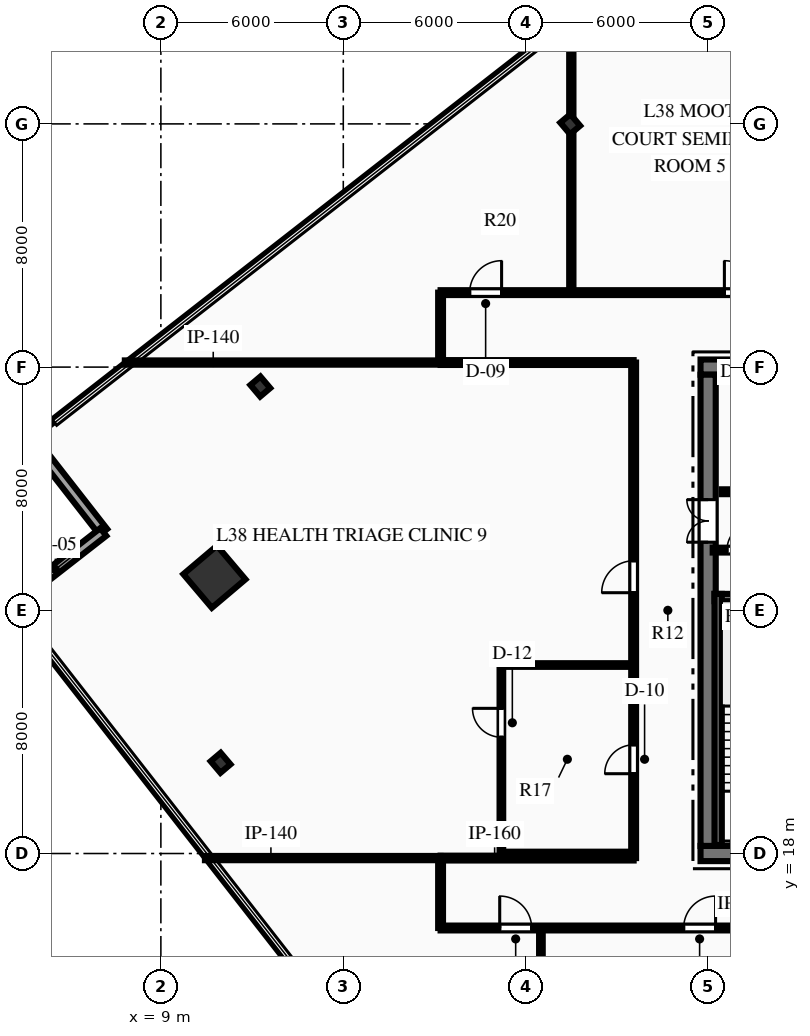
"""IFC4 building model, lengths in metres.
Left out: names, types, materials, properties, quantities, classifications, styles, units other than length and angle.
Written with IfcOpenShell. Run it as: python <this file> out.ifc"""

import sys

from ifc_helpers import new_model, si_unit, direction, frame, frame_2d, origin, origin_2d, place, context, subcontext, project, spatial, rectangle, hollow_rectangle, i_section, extrude, element, fill, save


model = new_model("IFC4")
c1 = context("Model", 3, precision=1e-05, world=origin(), true_north=direction((0.0, 1.0)))
c2 = subcontext(c1, "Body", "Model", "MODEL_VIEW")
j1 = project(units=[si_unit("LENGTHUNIT", "METRE"), si_unit("PLANEANGLEUNIT", "RADIAN")], contexts=[c1])
p1 = place(None, origin())
s1 = spatial("IfcSite", under=j1, at=p1, CompositionType="ELEMENT")
p2 = place(p1, origin())
s2 = spatial("IfcBuilding", under=s1, at=p2, CompositionType="ELEMENT")
p3 = place(p2, frame((0.0, 0.0, 155.7)))
s3 = spatial("IfcBuildingStorey", under=s2, at=p3, CompositionType="ELEMENT", Elevation=155.7)
p4 = place(p3, frame((26.75, 18.0, 0.0), z_axis=(0.0, 0.0, 1.0), x_axis=(1.0, 0.0, 0.0)))
e1 = element("IfcWall", 1, at=p4, inside=s3, PredefinedType="SHEAR", context=c2, shape_type="SweptSolid", body=[
    extrude(rectangle(XDim=18.5, YDim=0.5, at=frame_2d((9.25, 0.0))), origin(), (0.0, 0.0, 1.0), 3.75),
])
p5 = place(p4, frame((7.35, 0.0, 0.0)))
e2 = element("IfcOpeningElement", 2, at=p5, cuts=e1, PredefinedType="OPENING", context=c2, shape_type="SweptSolid", body=[
    extrude(rectangle(XDim=1.1, YDim=2.15, at=frame_2d((0.55, 1.075))), frame((0.0, 0.26, 0.0), z_axis=(0.0, -1.0, 0.0), x_axis=(1.0, 0.0, 0.0)), (0.0, 0.0, 1.0), 0.52),
])
p6 = place(p4, frame((10.05, 0.0, 0.0)))
e3 = element("IfcOpeningElement", 3, at=p6, cuts=e1, PredefinedType="OPENING", context=c2, shape_type="SweptSolid", body=[
    extrude(rectangle(XDim=1.1, YDim=2.15, at=frame_2d((0.55, 1.075))), frame((0.0, 0.26, 0.0), z_axis=(0.0, -1.0, 0.0), x_axis=(1.0, 0.0, 0.0)), (0.0, 0.0, 1.0), 0.52),
])
p7 = place(p3, frame((26.75, 34.0, 0.0), z_axis=(0.0, 0.0, 1.0), x_axis=(1.0, 0.0, 0.0)))
e4 = element("IfcWall", 4, at=p7, inside=s3, PredefinedType="SHEAR", context=c2, shape_type="SweptSolid", body=[
    extrude(rectangle(XDim=18.5, YDim=0.5, at=frame_2d((9.25, 0.0))), origin(), (0.0, 0.0, 1.0), 3.75),
])
p8 = place(p7, frame((13.935, 0.0, 0.0)))
e5 = element("IfcOpeningElement", 5, at=p8, cuts=e4, PredefinedType="OPENING", context=c2, shape_type="SweptSolid", body=[
    extrude(rectangle(XDim=1.1, YDim=2.15, at=frame_2d((0.55, 1.075))), frame((0.0, 0.26, 0.0), z_axis=(0.0, -1.0, 0.0), x_axis=(1.0, 0.0, 0.0)), (0.0, 0.0, 1.0), 0.52),
])
p9 = place(p7, frame((16.185, 0.0, 0.0)))
e6 = element("IfcOpeningElement", 6, at=p9, cuts=e4, PredefinedType="OPENING", context=c2, shape_type="SweptSolid", body=[
    extrude(rectangle(XDim=1.1, YDim=2.15, at=frame_2d((0.55, 1.075))), frame((0.0, 0.26, 0.0), z_axis=(0.0, -1.0, 0.0), x_axis=(1.0, 0.0, 0.0)), (0.0, 0.0, 1.0), 0.52),
])
p10 = place(p3, frame((27.0, 18.25, 0.0), z_axis=(0.0, 0.0, 1.0), x_axis=(0.0, 1.0, 0.0)))
e7 = element("IfcWall", 7, at=p10, inside=s3, PredefinedType="SHEAR", context=c2, shape_type="SweptSolid", body=[
    extrude(rectangle(XDim=15.5, YDim=0.5, at=frame_2d((7.75, 0.0))), origin(), (0.0, 0.0, 1.0), 3.75),
])
p11 = place(p10, frame((9.99, 0.0, 0.0)))
e8 = element("IfcOpeningElement", 8, at=p11, cuts=e7, PredefinedType="OPENING", context=c2, shape_type="SweptSolid", body=[
    extrude(rectangle(XDim=1.4, YDim=2.2, at=frame_2d((0.7, 1.1))), frame((0.0, 0.26, 0.0), z_axis=(0.0, -1.0, 0.0), x_axis=(1.0, 0.0, 0.0)), (0.0, 0.0, 1.0), 0.52),
])
p12 = place(p3, frame((27.21, 26.42, 0.0), z_axis=(0.0, 0.0, 1.0), x_axis=(1.0, 0.0, 0.0)))
e9 = element("IfcWall", 9, at=p12, inside=s3, PredefinedType="SHEAR", context=c2, shape_type="SweptSolid", body=[
    extrude(rectangle(XDim=3.98, YDim=0.24, at=frame_2d((1.99, 0.0))), origin(), (0.0, 0.0, 1.0), 3.75),
])
p13 = place(p3, frame((27.33, 18.28, 0.0), z_axis=(0.0, 0.0, 1.0), x_axis=(0.0, 1.0, 0.0)))
e10 = element("IfcWall", 10, at=p13, inside=s3, PredefinedType="SHEAR", context=c2, shape_type="SweptSolid", body=[
    extrude(rectangle(XDim=8.26, YDim=0.24, at=frame_2d((4.13, 0.0))), origin(), (0.0, 0.0, 1.0), 3.75),
])
p14 = place(p3, frame((10.761, 27.104, 0.0), z_axis=(0.0, 0.0, 1.0), x_axis=(0.763232469783, 0.646123979643, 0.0)))
e11 = element("IfcColumn", 11, at=p14, inside=s3, PredefinedType="COLUMN", context=c2, shape_type="SweptSolid", body=[
    extrude(hollow_rectangle(XDim=1.45, YDim=1.45, WallThickness=0.07, at=origin_2d()), origin(), (0.0, 0.0, 1.0), 3.75),
])
for number, where, z_axis, x_axis in (
    (12, (22.464, 41.99, 0.0), (0.0, 0.0, 1.0), (0.763, 0.646, 0.0)),
    (13, (12.27, 33.36, 0.0), (0.0, 0.0, 1.0), (0.763, 0.646, 0.0)),
    (14, (10.963, 20.983, 0.0), (0.0, 0.0, 1.0), (0.763, 0.646, 0.0)),
):
    element("IfcColumn", number, at=place(p3, frame(where, z_axis=z_axis, x_axis=x_axis)), inside=s3, PredefinedType="COLUMN", context=c2, shape_type="SweptSolid", body=[
        extrude(i_section(OverallWidth=0.432, OverallDepth=0.498, WebThickness=0.056, FlangeThickness=0.089, at=origin_2d()), origin(), (0.0, 0.0, 1.0), 3.75),
    ])
p15 = place(p3, frame((4.646, 31.73, 0.0), z_axis=(0.0, 0.0, 1.0), x_axis=(0.788562815333, 0.614954214778, 0.0)))
e15 = element("IfcWall", 15, at=p15, inside=s3, PredefinedType="STANDARD", context=c2, shape_type="SweptSolid", body=[
    extrude(rectangle(XDim=0.9, YDim=0.32, at=frame_2d((0.45, 0.0))), origin(), (0.0, 0.0, 1.0), 3.46),
])
p16 = place(p3, frame((7.106, 28.576, 0.0), z_axis=(0.0, 0.0, 1.0), x_axis=(-0.614933129106, 0.788579258368, 0.0)))
e16 = element("IfcWall", 16, at=p16, inside=s3, PredefinedType="STANDARD", context=c2, shape_type="SweptSolid", body=[
    extrude(rectangle(XDim=4.0, YDim=0.32, at=frame_2d((2.0, 0.0))), origin(), (0.0, 0.0, 1.0), 3.46),
])
p17 = place(p3, frame((3.952, 26.116, 0.0), z_axis=(0.0, 0.0, 1.0), x_axis=(0.788556176552, 0.614962727669, 0.0)))
e17 = element("IfcWall", 17, at=p17, inside=s3, PredefinedType="STANDARD", context=c2, shape_type="SweptSolid", body=[
    extrude(rectangle(XDim=4.0, YDim=0.32, at=frame_2d((2.0, 0.0))), origin(), (0.0, 0.0, 1.0), 3.46),
])
p18 = place(p17, frame((1.275, 0.0, 0.85)))
e18 = element("IfcOpeningElement", 18, at=p18, cuts=e17, PredefinedType="OPENING", context=c2, shape_type="SweptSolid", body=[
    extrude(rectangle(XDim=1.45, YDim=2.05, at=frame_2d((0.725, 1.025))), frame((0.0, 0.17, 0.0), z_axis=(0.0, -1.0, 0.0), x_axis=(1.0, 0.0, 0.0)), (0.0, 0.0, 1.0), 0.34),
])
p19 = place(p3, frame((27.15, 27.98, 0.0), z_axis=(0.0, 0.0, 1.0), x_axis=(1.0, 0.0, 0.0)))
e19 = element("IfcWall", 19, at=p19, inside=s3, PredefinedType="PARTITIONING", context=c2, shape_type="SweptSolid", body=[
    extrude(rectangle(XDim=4.05, YDim=0.16, at=frame_2d((2.025, 0.0))), origin(), (0.0, 0.0, 1.0), 3.46),
])
p20 = place(p19, frame((0.47, 0.0, 0.0)))
e20 = element("IfcOpeningElement", 20, at=p20, cuts=e19, PredefinedType="OPENING", context=c2, shape_type="SweptSolid", body=[
    extrude(rectangle(XDim=0.9, YDim=2.15, at=frame_2d((0.45, 1.075))), frame((0.0, 0.09, 0.0), z_axis=(0.0, -1.0, 0.0), x_axis=(1.0, 0.0, 0.0)), (0.0, 0.0, 1.0), 0.18),
])
p21 = place(p19, frame((2.36, 0.0, 0.0)))
e21 = element("IfcOpeningElement", 21, at=p21, cuts=e19, PredefinedType="OPENING", context=c2, shape_type="SweptSolid", body=[
    extrude(rectangle(XDim=0.9, YDim=2.15, at=frame_2d((0.45, 1.075))), frame((0.0, 0.09, 0.0), z_axis=(0.0, -1.0, 0.0), x_axis=(1.0, 0.0, 0.0)), (0.0, 0.0, 1.0), 0.18),
])
p22 = place(p3, frame((27.45, 29.9, 0.0), z_axis=(0.0, 0.0, 1.0), x_axis=(1.0, 0.0, 0.0)))
e22 = element("IfcWall", 22, at=p22, inside=s3, PredefinedType="PARTITIONING", context=c2, shape_type="SweptSolid", body=[
    extrude(rectangle(XDim=4.43, YDim=0.16, at=frame_2d((2.215, 0.0))), origin(), (0.0, 0.0, 1.0), 3.46),
])
p23 = place(p22, frame((0.6, 0.0, 0.0)))
e23 = element("IfcOpeningElement", 23, at=p23, cuts=e22, PredefinedType="OPENING", context=c2, shape_type="SweptSolid", body=[
    extrude(rectangle(XDim=0.9, YDim=2.15, at=frame_2d((0.45, 1.075))), frame((0.0, 0.09, 0.0), z_axis=(0.0, -1.0, 0.0), x_axis=(1.0, 0.0, 0.0)), (0.0, 0.0, 1.0), 0.18),
])
p24 = place(p22, frame((2.85, 0.0, 0.0)))
e24 = element("IfcOpeningElement", 24, at=p24, cuts=e22, PredefinedType="OPENING", context=c2, shape_type="SweptSolid", body=[
    extrude(rectangle(XDim=0.9, YDim=2.15, at=frame_2d((0.45, 1.075))), frame((0.0, 0.09, 0.0), z_axis=(0.0, -1.0, 0.0), x_axis=(1.0, 0.0, 0.0)), (0.0, 0.0, 1.0), 0.18),
])
p25 = place(p3, frame((18.2, 15.55, 0.0), z_axis=(0.0, 0.0, 1.0), x_axis=(1.0, 0.0, 0.0)))
e25 = element("IfcWall", 25, at=p25, inside=s3, PredefinedType="PARTITIONING", context=c2, shape_type="SweptSolid", body=[
    extrude(rectangle(XDim=35.6, YDim=0.16, at=frame_2d((17.8, 0.0))), origin(), (0.0, 0.0, 1.0), 3.46),
])
p26 = place(p25, frame((22.45, 0.0, 0.0)))
e26 = element("IfcOpeningElement", 26, at=p26, cuts=e25, PredefinedType="OPENING", context=c2, shape_type="SweptSolid", body=[
    extrude(rectangle(XDim=0.9, YDim=2.15, at=frame_2d((0.45, 1.075))), frame((0.0, 0.09, 0.0), z_axis=(0.0, -1.0, 0.0), x_axis=(1.0, 0.0, 0.0)), (0.0, 0.0, 1.0), 0.18),
])
p27 = place(p25, frame((24.75, 0.0, 0.0)))
e27 = element("IfcOpeningElement", 27, at=p27, cuts=e25, PredefinedType="OPENING", context=c2, shape_type="SweptSolid", body=[
    extrude(rectangle(XDim=0.9, YDim=2.15, at=frame_2d((0.45, 1.075))), frame((0.0, 0.09, 0.0), z_axis=(0.0, -1.0, 0.0), x_axis=(1.0, 0.0, 0.0)), (0.0, 0.0, 1.0), 0.18),
])
p28 = place(p25, frame((27.0, 0.0, 0.0)))
e28 = element("IfcOpeningElement", 28, at=p28, cuts=e25, PredefinedType="OPENING", context=c2, shape_type="SweptSolid", body=[
    extrude(rectangle(XDim=1.0, YDim=2.15, at=frame_2d((0.5, 1.075))), frame((0.0, 0.09, 0.0), z_axis=(0.0, -1.0, 0.0), x_axis=(1.0, 0.0, 0.0)), (0.0, 0.0, 1.0), 0.18),
])
p29 = place(p25, frame((1.945, 0.0, 0.0)))
e29 = element("IfcOpeningElement", 29, at=p29, cuts=e25, PredefinedType="OPENING", context=c2, shape_type="SweptSolid", body=[
    extrude(rectangle(XDim=1.05, YDim=2.15, at=frame_2d((0.525, 1.075))), frame((0.0, 0.09, 0.0), z_axis=(0.0, -1.0, 0.0), x_axis=(1.0, 0.0, 0.0)), (0.0, 0.0, 1.0), 0.18),
])
p30 = place(p25, frame((7.995, 0.0, 0.0)))
e30 = element("IfcOpeningElement", 30, at=p30, cuts=e25, PredefinedType="OPENING", context=c2, shape_type="SweptSolid", body=[
    extrude(rectangle(XDim=1.05, YDim=2.15, at=frame_2d((0.525, 1.075))), frame((0.0, 0.09, 0.0), z_axis=(0.0, -1.0, 0.0), x_axis=(1.0, 0.0, 0.0)), (0.0, 0.0, 1.0), 0.18),
])
p31 = place(p25, frame((15.74, 0.0, 0.0)))
e31 = element("IfcOpeningElement", 31, at=p31, cuts=e25, PredefinedType="OPENING", context=c2, shape_type="SweptSolid", body=[
    extrude(rectangle(XDim=1.05, YDim=2.15, at=frame_2d((0.525, 1.075))), frame((0.0, 0.09, 0.0), z_axis=(0.0, -1.0, 0.0), x_axis=(1.0, 0.0, 0.0)), (0.0, 0.0, 1.0), 0.18),
])
p32 = place(p3, frame((18.2, 17.85, 0.0), z_axis=(0.0, 0.0, 1.0), x_axis=(1.0, 0.0, 0.0)))
e32 = element("IfcWall", 32, at=p32, inside=s3, PredefinedType="PARTITIONING", context=c2, shape_type="SweptSolid", body=[
    extrude(rectangle(XDim=6.35, YDim=0.16, at=frame_2d((3.175, 0.0))), origin(), (0.0, 0.0, 1.0), 3.46),
])
p33 = place(p3, frame((18.2, 36.45, 0.0), z_axis=(0.0, 0.0, 1.0), x_axis=(1.0, 0.0, 0.0)))
e33 = element("IfcWall", 33, at=p33, inside=s3, PredefinedType="PARTITIONING", context=c2, shape_type="SweptSolid", body=[
    extrude(rectangle(XDim=35.6, YDim=0.16, at=frame_2d((17.8, 0.0))), origin(), (0.0, 0.0, 1.0), 3.46),
])
p34 = place(p33, frame((0.957, 0.0, 0.0)))
e34 = element("IfcOpeningElement", 34, at=p34, cuts=e33, PredefinedType="OPENING", context=c2, shape_type="SweptSolid", body=[
    extrude(rectangle(XDim=1.05, YDim=2.15, at=frame_2d((0.525, 1.075))), frame((0.0, 0.09, 0.0), z_axis=(0.0, -1.0, 0.0), x_axis=(1.0, 0.0, 0.0)), (0.0, 0.0, 1.0), 0.18),
])
p35 = place(p33, frame((9.335, 0.0, 0.0)))
e35 = element("IfcOpeningElement", 35, at=p35, cuts=e33, PredefinedType="OPENING", context=c2, shape_type="SweptSolid", body=[
    extrude(rectangle(XDim=1.05, YDim=2.15, at=frame_2d((0.525, 1.075))), frame((0.0, 0.09, 0.0), z_axis=(0.0, -1.0, 0.0), x_axis=(1.0, 0.0, 0.0)), (0.0, 0.0, 1.0), 0.18),
])
p36 = place(p33, frame((17.675, 0.0, 0.0)))
e36 = element("IfcOpeningElement", 36, at=p36, cuts=e33, PredefinedType="OPENING", context=c2, shape_type="SweptSolid", body=[
    extrude(rectangle(XDim=1.05, YDim=2.15, at=frame_2d((0.525, 1.075))), frame((0.0, 0.09, 0.0), z_axis=(0.0, -1.0, 0.0), x_axis=(1.0, 0.0, 0.0)), (0.0, 0.0, 1.0), 0.18),
])
p37 = place(p33, frame((22.875, 0.0, 0.0)))
e37 = element("IfcOpeningElement", 37, at=p37, cuts=e33, PredefinedType="OPENING", context=c2, shape_type="SweptSolid", body=[
    extrude(rectangle(XDim=1.05, YDim=2.15, at=frame_2d((0.525, 1.075))), frame((0.0, 0.09, 0.0), z_axis=(0.0, -1.0, 0.0), x_axis=(1.0, 0.0, 0.0)), (0.0, 0.0, 1.0), 0.18),
])
p38 = place(p33, frame((30.565, 0.0, 0.0)))
e38 = element("IfcOpeningElement", 38, at=p38, cuts=e33, PredefinedType="OPENING", context=c2, shape_type="SweptSolid", body=[
    extrude(rectangle(XDim=1.05, YDim=2.15, at=frame_2d((0.525, 1.075))), frame((0.0, 0.09, 0.0), z_axis=(0.0, -1.0, 0.0), x_axis=(1.0, 0.0, 0.0)), (0.0, 0.0, 1.0), 0.18),
])
p39 = place(p3, frame((18.2, 34.15, 0.0), z_axis=(0.0, 0.0, 1.0), x_axis=(1.0, 0.0, 0.0)))
e39 = element("IfcWall", 39, at=p39, inside=s3, PredefinedType="PARTITIONING", context=c2, shape_type="SweptSolid", body=[
    extrude(rectangle(XDim=6.35, YDim=0.16, at=frame_2d((3.175, 0.0))), origin(), (0.0, 0.0, 1.0), 3.46),
])
p40 = place(p3, frame((24.55, 17.85, 0.0), z_axis=(0.0, 0.0, 1.0), x_axis=(0.0, 1.0, 0.0)))
e40 = element("IfcWall", 40, at=p40, inside=s3, PredefinedType="PARTITIONING", context=c2, shape_type="SweptSolid", body=[
    extrude(rectangle(XDim=16.3, YDim=0.16, at=frame_2d((8.15, 0.0))), origin(), (0.0, 0.0, 1.0), 3.46),
])
p41 = place(p40, frame((2.775, 0.0, 0.0)))
e41 = element("IfcOpeningElement", 41, at=p41, cuts=e40, PredefinedType="OPENING", context=c2, shape_type="SweptSolid", body=[
    extrude(rectangle(XDim=0.95, YDim=2.15, at=frame_2d((0.475, 1.075))), frame((0.0, 0.09, 0.0), z_axis=(0.0, -1.0, 0.0), x_axis=(1.0, 0.0, 0.0)), (0.0, 0.0, 1.0), 0.18),
])
p42 = place(p40, frame((8.729, 0.0, 0.0)))
e42 = element("IfcOpeningElement", 42, at=p42, cuts=e40, PredefinedType="OPENING", context=c2, shape_type="SweptSolid", body=[
    extrude(rectangle(XDim=1.05, YDim=2.15, at=frame_2d((0.525, 1.075))), frame((0.0, 0.09, 0.0), z_axis=(0.0, -1.0, 0.0), x_axis=(1.0, 0.0, 0.0)), (0.0, 0.0, 1.0), 0.18),
])
for number, where, z_axis, x_axis in (
    (43, (18.2, 15.55, 0.0), (0.0, 0.0, 1.0), (0.0, 1.0, 0.0)),
    (44, (18.2, 34.15, 0.0), (0.0, 0.0, 1.0), (0.0, 1.0, 0.0)),
):
    element("IfcWall", number, at=place(p3, frame(where, z_axis=z_axis, x_axis=x_axis)), inside=s3, PredefinedType="PARTITIONING", context=c2, shape_type="SweptSolid", body=[
        extrude(rectangle(XDim=2.3, YDim=0.16, at=frame_2d((1.15, 0.0))), origin(), (0.0, 0.0, 1.0), 3.46),
    ])
p43 = place(p3, frame((10.449, 17.85, 0.0), z_axis=(0.0, 0.0, 1.0), x_axis=(1.0, 0.0, 0.0)))
e45 = element("IfcWall", 45, at=p43, inside=s3, PredefinedType="PARTITIONING", context=c2, shape_type="SweptSolid", body=[
    extrude(rectangle(XDim=7.751, YDim=0.14, at=frame_2d((3.875, 0.0))), origin(), (0.0, 0.0, 1.0), 3.46),
])
p44 = place(p3, frame((7.814, 34.15, 0.0), z_axis=(0.0, 0.0, 1.0), x_axis=(1.0, 0.0, 0.0)))
e46 = element("IfcWall", 46, at=p44, inside=s3, PredefinedType="PARTITIONING", context=c2, shape_type="SweptSolid", body=[
    extrude(rectangle(XDim=10.385, YDim=0.14, at=frame_2d((5.193, 0.0))), origin(), (0.0, 0.0, 1.0), 3.46),
])
p45 = place(p3, frame((21.5, 3.68, 0.0), z_axis=(0.0, 0.0, 1.0), x_axis=(0.0, 1.0, 0.0)))
e47 = element("IfcWall", 47, at=p45, inside=s3, PredefinedType="PARTITIONING", context=c2, shape_type="SweptSolid", body=[
    extrude(rectangle(XDim=11.87, YDim=0.12, at=frame_2d((5.935, 0.0))), origin(), (0.0, 0.0, 1.0), 3.46),
])
p46 = place(p3, frame((22.5, 36.45, 0.0), z_axis=(0.0, 0.0, 1.0), x_axis=(0.0, 1.0, 0.0)))
e48 = element("IfcWall", 48, at=p46, inside=s3, PredefinedType="PARTITIONING", context=c2, shape_type="SweptSolid", body=[
    extrude(rectangle(XDim=9.153, YDim=0.14, at=frame_2d((4.577, 0.0))), origin(), (0.0, 0.0, 1.0), 3.46),
])
p47 = place(p3, frame((20.2, 18.0, 0.0), z_axis=(0.0, 0.0, 1.0), x_axis=(1.0, 0.0, 0.0)))
e49 = element("IfcWall", 49, at=p47, inside=s3, PredefinedType="PARTITIONING", context=c2, shape_type="SweptSolid", body=[
    extrude(rectangle(XDim=4.35, YDim=0.12, at=frame_2d((2.175, 0.0))), origin(), (0.0, 0.0, 1.0), 3.46),
])
p48 = place(p3, frame((20.2, 18.0, 0.0), z_axis=(0.0, 0.0, 1.0), x_axis=(0.0, 1.0, 0.0)))
e50 = element("IfcWall", 50, at=p48, inside=s3, PredefinedType="PARTITIONING", context=c2, shape_type="SweptSolid", body=[
    extrude(rectangle(XDim=6.2, YDim=0.12, at=frame_2d((3.1, 0.0))), origin(), (0.0, 0.0, 1.0), 3.46),
])
p49 = place(p48, frame((3.825, 0.0, 0.0)))
e51 = element("IfcOpeningElement", 51, at=p49, cuts=e50, PredefinedType="OPENING", context=c2, shape_type="SweptSolid", body=[
    extrude(rectangle(XDim=0.95, YDim=2.15, at=frame_2d((0.475, 1.075))), frame((0.0, 0.07, 0.0), z_axis=(0.0, -1.0, 0.0), x_axis=(1.0, 0.0, 0.0)), (0.0, 0.0, 1.0), 0.14),
])
p50 = place(p3, frame((20.2, 24.2, 0.0), z_axis=(0.0, 0.0, 1.0), x_axis=(1.0, 0.0, 0.0)))
e52 = element("IfcWall", 52, at=p50, inside=s3, PredefinedType="PARTITIONING", context=c2, shape_type="SweptSolid", body=[
    extrude(rectangle(XDim=4.35, YDim=0.12, at=frame_2d((2.175, 0.0))), origin(), (0.0, 0.0, 1.0), 3.46),
])
p51 = place(p18, origin())
e53 = element("IfcWindow", 53, at=p51, inside=s3, PartitioningType="SINGLE_PANEL", PredefinedType="WINDOW", context=c2, shape_type="SweptSolid", body=[
    extrude(rectangle(XDim=1.45, YDim=2.05, at=frame_2d((0.725, 1.025))), frame((0.0, 0.03, 0.0), z_axis=(0.0, -1.0, 0.0), x_axis=(1.0, 0.0, 0.0)), (0.0, 0.0, 1.0), 0.06),
])
fill(e18, e53)
p52 = place(p20, origin())
e54 = element("IfcDoor", 54, at=p52, inside=s3, OperationType="SINGLE_SWING_RIGHT", PredefinedType="DOOR", context=c2, shape_type="SweptSolid", body=[
    extrude(rectangle(XDim=0.9, YDim=2.15, at=frame_2d((0.45, 1.075))), frame((0.0, 0.025, 0.0), z_axis=(0.0, -1.0, 0.0), x_axis=(1.0, 0.0, 0.0)), (0.0, 0.0, 1.0), 0.05),
])
fill(e20, e54)
p53 = place(p11, origin())
e55 = element("IfcDoor", 55, at=p53, inside=s3, OperationType="DOUBLE_DOOR_SINGLE_SWING", PredefinedType="DOOR", context=c2, shape_type="SweptSolid", body=[
    extrude(rectangle(XDim=1.4, YDim=2.2, at=frame_2d((0.7, 1.1))), frame((0.0, 0.025, 0.0), z_axis=(0.0, -1.0, 0.0), x_axis=(1.0, 0.0, 0.0)), (0.0, 0.0, 1.0), 0.05),
])
fill(e8, e55)
p54 = place(p41, origin())
e56 = element("IfcDoor", 56, at=p54, inside=s3, OperationType="SINGLE_SWING_LEFT", PredefinedType="DOOR", context=c2, shape_type="SweptSolid", body=[
    extrude(rectangle(XDim=0.95, YDim=2.15, at=frame_2d((0.475, 1.075))), frame((0.0, 0.025, 0.0), z_axis=(0.0, -1.0, 0.0), x_axis=(1.0, 0.0, 0.0)), (0.0, 0.0, 1.0), 0.05),
])
fill(e41, e56)
p55 = place(p49, origin())
e57 = element("IfcDoor", 57, at=p55, inside=s3, OperationType="SINGLE_SWING_RIGHT", PredefinedType="DOOR", context=c2, shape_type="SweptSolid", body=[
    extrude(rectangle(XDim=0.95, YDim=2.15, at=frame_2d((0.475, 1.075))), frame((0.0, 0.025, 0.0), z_axis=(0.0, -1.0, 0.0), x_axis=(1.0, 0.0, 0.0)), (0.0, 0.0, 1.0), 0.05),
])
fill(e51, e57)
p56 = place(p29, origin())
e58 = element("IfcDoor", 58, at=p56, inside=s3, OperationType="SINGLE_SWING_LEFT", PredefinedType="DOOR", context=c2, shape_type="SweptSolid", body=[
    extrude(rectangle(XDim=1.05, YDim=2.15, at=frame_2d((0.525, 1.075))), frame((0.0, 0.025, 0.0), z_axis=(0.0, -1.0, 0.0), x_axis=(1.0, 0.0, 0.0)), (0.0, 0.0, 1.0), 0.05),
])
fill(e29, e58)
p57 = place(p30, origin())
e59 = element("IfcDoor", 59, at=p57, inside=s3, OperationType="SINGLE_SWING_RIGHT", PredefinedType="DOOR", context=c2, shape_type="SweptSolid", body=[
    extrude(rectangle(XDim=1.05, YDim=2.15, at=frame_2d((0.525, 1.075))), frame((0.0, 0.025, 0.0), z_axis=(0.0, -1.0, 0.0), x_axis=(1.0, 0.0, 0.0)), (0.0, 0.0, 1.0), 0.05),
])
fill(e30, e59)
p58 = place(p34, origin())
e60 = element("IfcDoor", 60, at=p58, inside=s3, OperationType="SINGLE_SWING_RIGHT", PredefinedType="DOOR", context=c2, shape_type="SweptSolid", body=[
    extrude(rectangle(XDim=1.05, YDim=2.15, at=frame_2d((0.525, 1.075))), frame((0.0, 0.025, 0.0), z_axis=(0.0, -1.0, 0.0), x_axis=(1.0, 0.0, 0.0)), (0.0, 0.0, 1.0), 0.05),
])
fill(e34, e60)
p59 = place(p35, origin())
e61 = element("IfcDoor", 61, at=p59, inside=s3, OperationType="SINGLE_SWING_LEFT", PredefinedType="DOOR", context=c2, shape_type="SweptSolid", body=[
    extrude(rectangle(XDim=1.05, YDim=2.15, at=frame_2d((0.525, 1.075))), frame((0.0, 0.025, 0.0), z_axis=(0.0, -1.0, 0.0), x_axis=(1.0, 0.0, 0.0)), (0.0, 0.0, 1.0), 0.05),
])
fill(e35, e61)
p60 = place(p42, origin())
e62 = element("IfcDoor", 62, at=p60, inside=s3, OperationType="SINGLE_SWING_LEFT", PredefinedType="DOOR", context=c2, shape_type="SweptSolid", body=[
    extrude(rectangle(XDim=1.05, YDim=2.15, at=frame_2d((0.525, 1.075))), frame((0.0, 0.025, 0.0), z_axis=(0.0, -1.0, 0.0), x_axis=(1.0, 0.0, 0.0)), (0.0, 0.0, 1.0), 0.05),
])
fill(e42, e62)
save(model, sys.argv[1])
